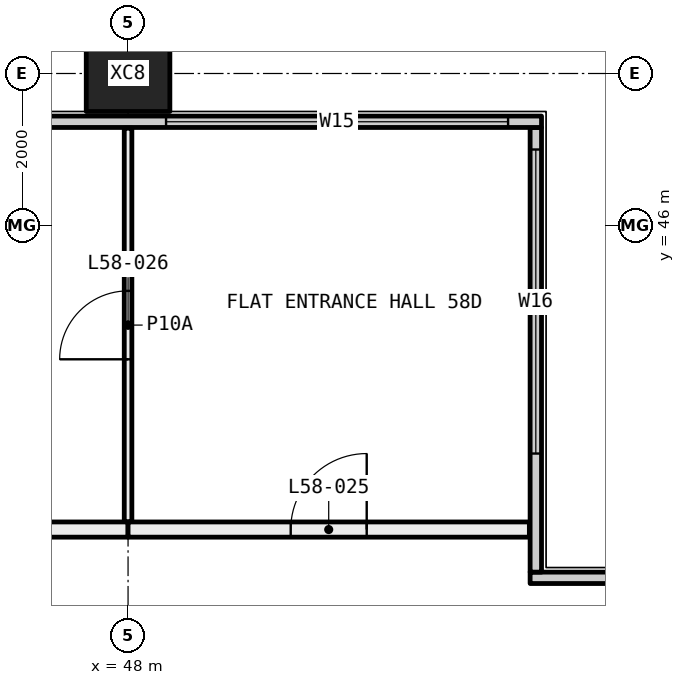
"""IFC4 building model, lengths in metres.
Left out: names, types, materials, properties, quantities, classifications, styles, units other than length and angle.
Written with IfcOpenShell. Run it as: python <this file> out.ifc"""

import sys

from ifc_helpers import new_model, si_unit, direction, frame, frame_2d, origin, origin_2d, place, context, subcontext, project, spatial, rectangle, hollow_rectangle, extrude, element, fill, save


model = new_model("IFC4")
c1 = context("Model", 3, precision=1e-05, world=origin(), true_north=direction((0.0, 1.0)))
c2 = subcontext(c1, "Body", "Model", "MODEL_VIEW")
j1 = project(units=[si_unit("LENGTHUNIT", "METRE"), si_unit("PLANEANGLEUNIT", "RADIAN")], contexts=[c1])
p1 = place(None, origin())
s1 = spatial("IfcSite", under=j1, at=p1, CompositionType="ELEMENT")
p2 = place(p1, origin())
s2 = spatial("IfcBuilding", under=s1, at=p2, CompositionType="ELEMENT")
p3 = place(p2, frame((0.0, 0.0, 217.95)))
s3 = spatial("IfcBuildingStorey", under=s2, at=p3, CompositionType="ELEMENT", Elevation=217.95)
p4 = place(p3, frame((48.0, 48.0, -0.4), z_axis=(0.0, 0.0, 1.0), x_axis=(1.0, 0.0, 0.0)))
e1 = element("IfcColumn", 1, at=p4, inside=s3, PredefinedType="COLUMN", context=c2, shape_type="SweptSolid", body=[
    extrude(hollow_rectangle(XDim=1.1, YDim=1.0, WallThickness=0.04, at=origin_2d()), origin(), (0.0, 0.0, 1.0), 3.45),
])
p5 = place(p3, frame((53.29, 41.365, 0.0), z_axis=(0.0, 0.0, 1.0), x_axis=(1.0, 0.0, 0.0)))
e2 = element("IfcWall", 2, at=p5, inside=s3, PredefinedType="ELEMENTEDWALL", context=c2, shape_type="SweptSolid", body=[
    extrude(rectangle(XDim=6.15, YDim=0.15, at=frame_2d((3.075, 0.0))), origin(), (0.0, 0.0, 1.0), 3.05),
])
p6 = place(p5, frame((1.71, 0.0, 0.45)))
e3 = element("IfcOpeningElement", 3, at=p6, cuts=e2, PredefinedType="OPENING", context=c2, shape_type="SweptSolid", body=[
    extrude(rectangle(XDim=4.0, YDim=2.55, at=frame_2d((2.0, 1.275))), frame((0.0, 0.085, 0.0), z_axis=(0.0, -1.0, 0.0), x_axis=(1.0, 0.0, 0.0)), (0.0, 0.0, 1.0), 0.17),
])
p7 = place(p3, frame((53.365, 41.44, 0.0), z_axis=(0.0, 0.0, 1.0), x_axis=(0.0, 1.0, 0.0)))
e4 = element("IfcWall", 4, at=p7, inside=s3, PredefinedType="ELEMENTEDWALL", context=c2, shape_type="SweptSolid", body=[
    extrude(rectangle(XDim=5.85, YDim=0.15, at=frame_2d((2.925, 0.0))), origin(), (0.0, 0.0, 1.0), 3.05),
])
p8 = place(p7, frame((1.56, 0.0, 0.45)))
e5 = element("IfcOpeningElement", 5, at=p8, cuts=e4, PredefinedType="OPENING", context=c2, shape_type="SweptSolid", body=[
    extrude(rectangle(XDim=4.0, YDim=2.55, at=frame_2d((2.0, 1.275))), frame((0.0, 0.085, 0.0), z_axis=(0.0, -1.0, 0.0), x_axis=(1.0, 0.0, 0.0)), (0.0, 0.0, 1.0), 0.17),
])
p9 = place(p3, frame((18.56, 47.365, 0.0), z_axis=(0.0, 0.0, 1.0), x_axis=(1.0, 0.0, 0.0)))
e6 = element("IfcWall", 6, at=p9, inside=s3, PredefinedType="ELEMENTEDWALL", context=c2, shape_type="SweptSolid", body=[
    extrude(rectangle(XDim=34.88, YDim=0.15, at=frame_2d((17.44, 0.0))), origin(), (0.0, 0.0, 1.0), 3.05),
])
p10 = place(p9, frame((0.44, 0.0, 0.45)))
e7 = element("IfcOpeningElement", 7, at=p10, cuts=e6, PredefinedType="OPENING", context=c2, shape_type="SweptSolid", body=[
    extrude(rectangle(XDim=4.5, YDim=2.55, at=frame_2d((2.25, 1.275))), frame((0.0, 0.085, 0.0), z_axis=(0.0, -1.0, 0.0), x_axis=(1.0, 0.0, 0.0)), (0.0, 0.0, 1.0), 0.17),
])
p11 = place(p9, frame((7.44, 0.0, 0.45)))
e8 = element("IfcOpeningElement", 8, at=p11, cuts=e6, PredefinedType="OPENING", context=c2, shape_type="SweptSolid", body=[
    extrude(rectangle(XDim=3.5, YDim=2.55, at=frame_2d((1.75, 1.275))), frame((0.0, 0.085, 0.0), z_axis=(0.0, -1.0, 0.0), x_axis=(1.0, 0.0, 0.0)), (0.0, 0.0, 1.0), 0.17),
])
p12 = place(p9, frame((11.94, 0.0, 0.45)))
e9 = element("IfcOpeningElement", 9, at=p12, cuts=e6, PredefinedType="OPENING", context=c2, shape_type="SweptSolid", body=[
    extrude(rectangle(XDim=2.0, YDim=2.55, at=frame_2d((1.0, 1.275))), frame((0.0, 0.085, 0.0), z_axis=(0.0, -1.0, 0.0), x_axis=(1.0, 0.0, 0.0)), (0.0, 0.0, 1.0), 0.17),
])
p13 = place(p9, frame((19.44, 0.0, 0.45)))
e10 = element("IfcOpeningElement", 10, at=p13, cuts=e6, PredefinedType="OPENING", context=c2, shape_type="SweptSolid", body=[
    extrude(rectangle(XDim=3.5, YDim=2.55, at=frame_2d((1.75, 1.275))), frame((0.0, 0.085, 0.0), z_axis=(0.0, -1.0, 0.0), x_axis=(1.0, 0.0, 0.0)), (0.0, 0.0, 1.0), 0.17),
])
p14 = place(p9, frame((23.94, 0.0, 0.45)))
e11 = element("IfcOpeningElement", 11, at=p14, cuts=e6, PredefinedType="OPENING", context=c2, shape_type="SweptSolid", body=[
    extrude(rectangle(XDim=3.5, YDim=2.55, at=frame_2d((1.75, 1.275))), frame((0.0, 0.085, 0.0), z_axis=(0.0, -1.0, 0.0), x_axis=(1.0, 0.0, 0.0)), (0.0, 0.0, 1.0), 0.17),
])
p15 = place(p9, frame((29.94, 0.0, 0.45)))
e12 = element("IfcOpeningElement", 12, at=p15, cuts=e6, PredefinedType="OPENING", context=c2, shape_type="SweptSolid", body=[
    extrude(rectangle(XDim=4.5, YDim=2.55, at=frame_2d((2.25, 1.275))), frame((0.0, 0.085, 0.0), z_axis=(0.0, -1.0, 0.0), x_axis=(1.0, 0.0, 0.0)), (0.0, 0.0, 1.0), 0.17),
])
p16 = place(p3, frame((48.0, 42.1, 0.0), z_axis=(0.0, 0.0, 1.0), x_axis=(0.0, 1.0, 0.0)))
e13 = element("IfcWall", 13, at=p16, inside=s3, PredefinedType="PARTITIONING", context=c2, shape_type="SweptSolid", body=[
    extrude(rectangle(XDim=5.18, YDim=0.1, at=frame_2d((2.59, 0.0))), origin(), (0.0, 0.0, 1.0), 3.05),
])
p17 = place(p16, frame((2.14, 0.0, 0.0)))
e14 = element("IfcOpeningElement", 14, at=p17, cuts=e13, PredefinedType="OPENING", context=c2, shape_type="SweptSolid", body=[
    extrude(rectangle(XDim=0.9, YDim=2.1, at=frame_2d((0.45, 1.05))), frame((0.0, 0.06, 0.0), z_axis=(0.0, -1.0, 0.0), x_axis=(1.0, 0.0, 0.0)), (0.0, 0.0, 1.0), 0.12),
])
p18 = place(p3, frame((46.1, 42.0, 0.0), z_axis=(0.0, 0.0, 1.0), x_axis=(1.0, 0.0, 0.0)))
e15 = element("IfcWall", 15, at=p18, inside=s3, PredefinedType="PARTITIONING", context=c2, shape_type="SweptSolid", body=[
    extrude(rectangle(XDim=1.9, YDim=0.2, at=frame_2d((0.95, 0.0))), origin(), (0.0, 0.0, 1.0), 3.05),
])
p19 = place(p3, frame((48.0, 42.0, 0.0), z_axis=(0.0, 0.0, 1.0), x_axis=(1.0, 0.0, 0.0)))
e16 = element("IfcWall", 16, at=p19, inside=s3, PredefinedType="PARTITIONING", context=c2, shape_type="SweptSolid", body=[
    extrude(rectangle(XDim=5.28, YDim=0.2, at=frame_2d((2.64, 0.0))), origin(), (0.0, 0.0, 1.0), 3.05),
])
p20 = place(p19, frame((2.14, 0.0, 0.0)))
e17 = element("IfcOpeningElement", 17, at=p20, cuts=e16, PredefinedType="OPENING", context=c2, shape_type="SweptSolid", body=[
    extrude(rectangle(XDim=1.0, YDim=2.1, at=frame_2d((0.5, 1.05))), frame((0.0, 0.11, 0.0), z_axis=(0.0, -1.0, 0.0), x_axis=(1.0, 0.0, 0.0)), (0.0, 0.0, 1.0), 0.22),
])
p21 = place(p8, origin())
e18 = element("IfcWindow", 18, at=p21, inside=s3, PartitioningType="SINGLE_PANEL", PredefinedType="WINDOW", context=c2, shape_type="SweptSolid", body=[
    extrude(rectangle(XDim=4.0, YDim=2.55, at=frame_2d((2.0, 1.275))), frame((0.0, 0.03, 0.0), z_axis=(0.0, -1.0, 0.0), x_axis=(1.0, 0.0, 0.0)), (0.0, 0.0, 1.0), 0.06),
])
fill(e5, e18)
p22 = place(p15, origin())
e19 = element("IfcWindow", 19, at=p22, inside=s3, PartitioningType="SINGLE_PANEL", PredefinedType="WINDOW", context=c2, shape_type="SweptSolid", body=[
    extrude(rectangle(XDim=4.5, YDim=2.55, at=frame_2d((2.25, 1.275))), frame((0.0, 0.03, 0.0), z_axis=(0.0, -1.0, 0.0), x_axis=(1.0, 0.0, 0.0)), (0.0, 0.0, 1.0), 0.06),
])
fill(e12, e19)
p23 = place(p20, origin())
e20 = element("IfcDoor", 20, at=p23, inside=s3, OperationType="SINGLE_SWING_LEFT", PredefinedType="DOOR", context=c2, shape_type="SweptSolid", body=[
    extrude(rectangle(XDim=1.0, YDim=2.1, at=frame_2d((0.5, 1.05))), frame((0.0, 0.025, 0.0), z_axis=(0.0, -1.0, 0.0), x_axis=(1.0, 0.0, 0.0)), (0.0, 0.0, 1.0), 0.05),
])
fill(e17, e20)
p24 = place(p17, origin())
e21 = element("IfcDoor", 21, at=p24, inside=s3, OperationType="SINGLE_SWING_RIGHT", PredefinedType="DOOR", context=c2, shape_type="SweptSolid", body=[
    extrude(rectangle(XDim=0.9, YDim=2.1, at=frame_2d((0.45, 1.05))), frame((0.0, 0.025, 0.0), z_axis=(0.0, -1.0, 0.0), x_axis=(1.0, 0.0, 0.0)), (0.0, 0.0, 1.0), 0.05),
])
fill(e14, e21)
save(model, sys.argv[1])
